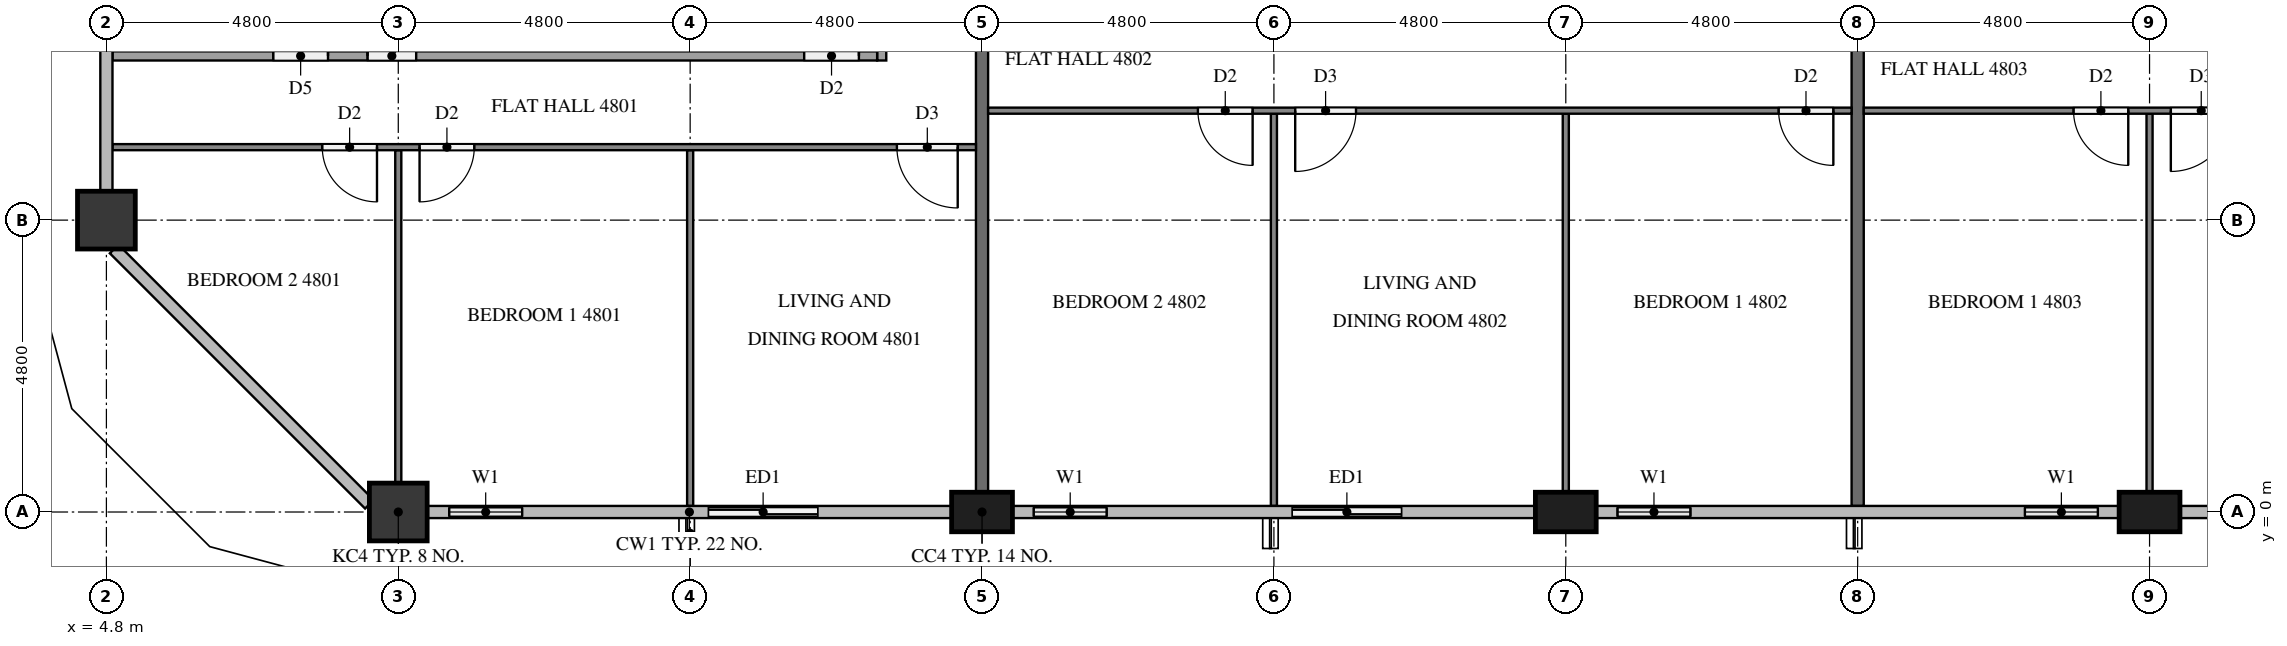
"""IFC4 building model, lengths in metres.
Left out: names, types, materials, properties, quantities, classifications, styles, units other than length and angle.
Written with IfcOpenShell. Run it as: python <this file> out.ifc"""

import sys

from ifc_helpers import new_model, si_unit, direction, frame, frame_2d, origin, origin_2d, place, context, subcontext, project, spatial, rectangle, extrude, element, fill, save


model = new_model("IFC4")
c1 = context("Model", 3, precision=1e-05, world=origin(), true_north=direction((0.0, 1.0)))
c2 = subcontext(c1, "Body", "Model", "MODEL_VIEW")
j1 = project(units=[si_unit("LENGTHUNIT", "METRE"), si_unit("PLANEANGLEUNIT", "RADIAN")], contexts=[c1])
p1 = place(None, origin())
s1 = spatial("IfcSite", under=j1, at=p1, CompositionType="ELEMENT")
p2 = place(p1, origin())
s2 = spatial("IfcBuilding", under=s1, at=p2, CompositionType="ELEMENT")
p3 = place(p2, frame((0.0, 0.0, 185.9)))
s3 = spatial("IfcBuildingStorey", under=s2, at=p3, CompositionType="ELEMENT", Elevation=185.9)
p4 = place(p3, frame((9.6, 0.0, 0.0), z_axis=(0.0, 0.0, 1.0), x_axis=(1.0, 0.0, 0.0)))
e1 = element("IfcColumn", 1, at=p4, inside=s3, PredefinedType="COLUMN", context=c2, shape_type="SweptSolid", body=[
    extrude(rectangle(XDim=0.95, YDim=0.95, at=origin_2d()), origin(), (0.0, 0.0, 1.0), 3.2),
])
for number, where, z_axis, x_axis in (
    (2, (19.2, 0.0, 0.0), (0.0, 0.0, 1.0), (1.0, 0.0, 0.0)),
    (3, (28.8, 0.0, 0.0), (0.0, 0.0, 1.0), (1.0, 0.0, 0.0)),
    (4, (38.4, 0.0, 0.0), (0.0, 0.0, 1.0), (1.0, 0.0, 0.0)),
):
    element("IfcColumn", number, at=place(p3, frame(where, z_axis=z_axis, x_axis=x_axis)), inside=s3, PredefinedType="COLUMN", context=c2, shape_type="SweptSolid", body=[
        extrude(rectangle(XDim=1.0, YDim=0.65, at=origin_2d()), origin(), (0.0, 0.0, 1.0), 3.2),
    ])
p5 = place(p3, frame((4.8, 4.8, 0.0), z_axis=(0.0, 0.0, 1.0), x_axis=(1.0, 0.0, 0.0)))
e5 = element("IfcColumn", 5, at=p5, inside=s3, PredefinedType="COLUMN", context=c2, shape_type="SweptSolid", body=[
    extrude(rectangle(XDim=0.95, YDim=0.95, at=origin_2d()), origin(), (0.0, 0.0, 1.0), 3.2),
])
p6 = place(p3, frame((10.075, 0.0, 0.0), z_axis=(0.0, 0.0, 1.0), x_axis=(1.0, 0.0, 0.0)))
e6 = element("IfcWall", 6, at=p6, inside=s3, PredefinedType="SOLIDWALL", context=c2, shape_type="SweptSolid", body=[
    extrude(rectangle(XDim=1.925, YDim=0.15, at=frame_2d((0.962, 0.0))), origin(), (0.0, 0.0, 1.0), 3.2),
])
p7 = place(p6, frame((0.363, 0.0, 0.9)))
e7 = element("IfcOpeningElement", 7, at=p7, cuts=e6, PredefinedType="OPENING", context=c2, shape_type="SweptSolid", body=[
    extrude(rectangle(XDim=1.2, YDim=1.4, at=frame_2d((0.6, 0.7))), frame((0.0, 0.085, 0.0), z_axis=(0.0, -1.0, 0.0), x_axis=(1.0, 0.0, 0.0)), (0.0, 0.0, 1.0), 0.17),
])
p8 = place(p3, frame((14.4, 0.0, 0.0), z_axis=(0.0, 0.0, 1.0), x_axis=(1.0, 0.0, 0.0)))
e8 = element("IfcWall", 8, at=p8, inside=s3, PredefinedType="SOLIDWALL", context=c2, shape_type="SweptSolid", body=[
    extrude(rectangle(XDim=2.4, YDim=0.15, at=frame_2d((1.2, 0.0))), origin(), (0.0, 0.0, 1.0), 3.2),
])
p9 = place(p8, frame((0.3, 0.0, 0.0)))
e9 = element("IfcOpeningElement", 9, at=p9, cuts=e8, PredefinedType="OPENING", context=c2, shape_type="SweptSolid", body=[
    extrude(rectangle(XDim=1.8, YDim=2.4, at=frame_2d((0.9, 1.2))), frame((0.0, 0.085, 0.0), z_axis=(0.0, -1.0, 0.0), x_axis=(1.0, 0.0, 0.0)), (0.0, 0.0, 1.0), 0.17),
])
p10 = place(p3, frame((19.7, 0.0, 0.0), z_axis=(0.0, 0.0, 1.0), x_axis=(1.0, 0.0, 0.0)))
e10 = element("IfcWall", 10, at=p10, inside=s3, PredefinedType="SOLIDWALL", context=c2, shape_type="SweptSolid", body=[
    extrude(rectangle(XDim=1.9, YDim=0.15, at=frame_2d((0.95, 0.0))), origin(), (0.0, 0.0, 1.0), 3.2),
])
p11 = place(p10, frame((0.35, 0.0, 0.9)))
e11 = element("IfcOpeningElement", 11, at=p11, cuts=e10, PredefinedType="OPENING", context=c2, shape_type="SweptSolid", body=[
    extrude(rectangle(XDim=1.2, YDim=1.4, at=frame_2d((0.6, 0.7))), frame((0.0, 0.085, 0.0), z_axis=(0.0, -1.0, 0.0), x_axis=(1.0, 0.0, 0.0)), (0.0, 0.0, 1.0), 0.17),
])
p12 = place(p3, frame((24.0, 0.0, 0.0), z_axis=(0.0, 0.0, 1.0), x_axis=(1.0, 0.0, 0.0)))
e12 = element("IfcWall", 12, at=p12, inside=s3, PredefinedType="SOLIDWALL", context=c2, shape_type="SweptSolid", body=[
    extrude(rectangle(XDim=2.4, YDim=0.15, at=frame_2d((1.2, 0.0))), origin(), (0.0, 0.0, 1.0), 3.2),
])
p13 = place(p12, frame((0.3, 0.0, 0.0)))
e13 = element("IfcOpeningElement", 13, at=p13, cuts=e12, PredefinedType="OPENING", context=c2, shape_type="SweptSolid", body=[
    extrude(rectangle(XDim=1.8, YDim=2.4, at=frame_2d((0.9, 1.2))), frame((0.0, 0.085, 0.0), z_axis=(0.0, -1.0, 0.0), x_axis=(1.0, 0.0, 0.0)), (0.0, 0.0, 1.0), 0.17),
])
p14 = place(p3, frame((29.3, 0.0, 0.0), z_axis=(0.0, 0.0, 1.0), x_axis=(1.0, 0.0, 0.0)))
e14 = element("IfcWall", 14, at=p14, inside=s3, PredefinedType="SOLIDWALL", context=c2, shape_type="SweptSolid", body=[
    extrude(rectangle(XDim=1.9, YDim=0.15, at=frame_2d((0.95, 0.0))), origin(), (0.0, 0.0, 1.0), 3.2),
])
p15 = place(p14, frame((0.35, 0.0, 0.9)))
e15 = element("IfcOpeningElement", 15, at=p15, cuts=e14, PredefinedType="OPENING", context=c2, shape_type="SweptSolid", body=[
    extrude(rectangle(XDim=1.2, YDim=1.4, at=frame_2d((0.6, 0.7))), frame((0.0, 0.085, 0.0), z_axis=(0.0, -1.0, 0.0), x_axis=(1.0, 0.0, 0.0)), (0.0, 0.0, 1.0), 0.17),
])
p16 = place(p3, frame((36.0, 0.0, 0.0), z_axis=(0.0, 0.0, 1.0), x_axis=(1.0, 0.0, 0.0)))
e16 = element("IfcWall", 16, at=p16, inside=s3, PredefinedType="SOLIDWALL", context=c2, shape_type="SweptSolid", body=[
    extrude(rectangle(XDim=1.9, YDim=0.15, at=frame_2d((0.95, 0.0))), origin(), (0.0, 0.0, 1.0), 3.2),
])
p17 = place(p16, frame((0.35, 0.0, 0.9)))
e17 = element("IfcOpeningElement", 17, at=p17, cuts=e16, PredefinedType="OPENING", context=c2, shape_type="SweptSolid", body=[
    extrude(rectangle(XDim=1.2, YDim=1.4, at=frame_2d((0.6, 0.7))), frame((0.0, 0.085, 0.0), z_axis=(0.0, -1.0, 0.0), x_axis=(1.0, 0.0, 0.0)), (0.0, 0.0, 1.0), 0.17),
])
p18 = place(p3, frame((19.2, 11.9, 0.0), z_axis=(0.0, 0.0, 1.0), x_axis=(0.0, -1.0, 0.0)))
e18 = element("IfcWall", 18, at=p18, inside=s3, PredefinedType="PARTITIONING", context=c2, shape_type="SweptSolid", body=[
    extrude(rectangle(XDim=11.575, YDim=0.2, at=frame_2d((5.788, 0.0))), origin(), (0.0, 0.0, 1.0), 3.2),
])
p19 = place(p3, frame((33.6, 11.9, 0.0), z_axis=(0.0, 0.0, 1.0), x_axis=(0.0, -1.0, 0.0)))
e19 = element("IfcWall", 19, at=p19, inside=s3, PredefinedType="PARTITIONING", context=c2, shape_type="SweptSolid", body=[
    extrude(rectangle(XDim=11.8, YDim=0.2, at=frame_2d((5.9, 0.0))), origin(), (0.0, 0.0, 1.0), 3.2),
])
p20 = place(p3, frame((14.4, 5.95, 0.0), z_axis=(0.0, 0.0, 1.0), x_axis=(0.0, -1.0, 0.0)))
e20 = element("IfcWall", 20, at=p20, inside=s3, PredefinedType="PARTITIONING", context=c2, shape_type="SweptSolid", body=[
    extrude(rectangle(XDim=5.85, YDim=0.1, at=frame_2d((2.925, 0.0))), origin(), (0.0, 0.0, 1.0), 3.2),
])
p21 = place(p3, frame((9.6, 5.95, 0.0), z_axis=(0.0, 0.0, 1.0), x_axis=(0.0, -1.0, 0.0)))
e21 = element("IfcWall", 21, at=p21, inside=s3, PredefinedType="PARTITIONING", context=c2, shape_type="SweptSolid", body=[
    extrude(rectangle(XDim=5.475, YDim=0.1, at=frame_2d((2.737, 0.0))), origin(), (0.0, 0.0, 1.0), 3.2),
])
p22 = place(p3, frame((19.1, 6.0, 0.0), z_axis=(0.0, 0.0, 1.0), x_axis=(-1.0, 0.0, 0.0)))
e22 = element("IfcWall", 22, at=p22, inside=s3, PredefinedType="PARTITIONING", context=c2, shape_type="SweptSolid", body=[
    extrude(rectangle(XDim=14.2, YDim=0.1, at=frame_2d((7.1, 0.0))), origin(), (0.0, 0.0, 1.0), 3.2),
])
p23 = place(p22, frame((0.3, 0.0, 0.0)))
e23 = element("IfcOpeningElement", 23, at=p23, cuts=e22, PredefinedType="OPENING", context=c2, shape_type="SweptSolid", body=[
    extrude(rectangle(XDim=1.0, YDim=2.1, at=frame_2d((0.5, 1.05))), frame((0.0, 0.06, 0.0), z_axis=(0.0, -1.0, 0.0), x_axis=(1.0, 0.0, 0.0)), (0.0, 0.0, 1.0), 0.12),
])
p24 = place(p22, frame((8.25, 0.0, 0.0)))
e24 = element("IfcOpeningElement", 24, at=p24, cuts=e22, PredefinedType="OPENING", context=c2, shape_type="SweptSolid", body=[
    extrude(rectangle(XDim=0.9, YDim=2.1, at=frame_2d((0.45, 1.05))), frame((0.0, 0.06, 0.0), z_axis=(0.0, -1.0, 0.0), x_axis=(1.0, 0.0, 0.0)), (0.0, 0.0, 1.0), 0.12),
])
p25 = place(p22, frame((9.85, 0.0, 0.0)))
e25 = element("IfcOpeningElement", 25, at=p25, cuts=e22, PredefinedType="OPENING", context=c2, shape_type="SweptSolid", body=[
    extrude(rectangle(XDim=0.9, YDim=2.1, at=frame_2d((0.45, 1.05))), frame((0.0, 0.06, 0.0), z_axis=(0.0, -1.0, 0.0), x_axis=(1.0, 0.0, 0.0)), (0.0, 0.0, 1.0), 0.12),
])
p26 = place(p3, frame((17.55, 11.9, 0.0), z_axis=(0.0, 0.0, 1.0), x_axis=(0.0, -1.0, 0.0)))
e26 = element("IfcWall", 26, at=p26, inside=s3, PredefinedType="PARTITIONING", context=c2, shape_type="SweptSolid", body=[
    extrude(rectangle(XDim=4.475, YDim=0.15, at=frame_2d((2.237, 0.0))), origin(), (0.0, 0.0, 1.0), 3.2),
])
p27 = place(p3, frame((4.9, 7.5, 0.0), z_axis=(0.0, 0.0, 1.0), x_axis=(1.0, 0.0, 0.0)))
e27 = element("IfcWall", 27, at=p27, inside=s3, PredefinedType="PARTITIONING", context=c2, shape_type="SweptSolid", body=[
    extrude(rectangle(XDim=12.575, YDim=0.15, at=frame_2d((6.288, 0.0))), origin(), (0.0, 0.0, 1.0), 3.2),
])
p28 = place(p27, frame((11.375, 0.0, 0.0)))
e28 = element("IfcOpeningElement", 28, at=p28, cuts=e27, PredefinedType="OPENING", context=c2, shape_type="SweptSolid", body=[
    extrude(rectangle(XDim=0.9, YDim=2.1, at=frame_2d((0.45, 1.05))), frame((0.0, 0.085, 0.0), z_axis=(0.0, -1.0, 0.0), x_axis=(1.0, 0.0, 0.0)), (0.0, 0.0, 1.0), 0.17),
])
p29 = place(p27, frame((4.194, 0.0, 0.0)))
e29 = element("IfcOpeningElement", 29, at=p29, cuts=e27, PredefinedType="OPENING", context=c2, shape_type="SweptSolid", body=[
    extrude(rectangle(XDim=0.8, YDim=2.1, at=frame_2d((0.4, 1.05))), frame((0.0, 0.085, 0.0), z_axis=(0.0, -1.0, 0.0), x_axis=(1.0, 0.0, 0.0)), (0.0, 0.0, 1.0), 0.17),
])
p30 = place(p27, frame((2.644, 0.0, 0.0)))
e30 = element("IfcOpeningElement", 30, at=p30, cuts=e27, PredefinedType="OPENING", context=c2, shape_type="SweptSolid", body=[
    extrude(rectangle(XDim=0.9, YDim=2.1, at=frame_2d((0.45, 1.05))), frame((0.0, 0.085, 0.0), z_axis=(0.0, -1.0, 0.0), x_axis=(1.0, 0.0, 0.0)), (0.0, 0.0, 1.0), 0.17),
])
p31 = place(p3, frame((28.8, 6.55, 0.0), z_axis=(0.0, 0.0, 1.0), x_axis=(0.0, -1.0, 0.0)))
e31 = element("IfcWall", 31, at=p31, inside=s3, PredefinedType="PARTITIONING", context=c2, shape_type="SweptSolid", body=[
    extrude(rectangle(XDim=6.225, YDim=0.1, at=frame_2d((3.113, 0.0))), origin(), (0.0, 0.0, 1.0), 3.2),
])
p32 = place(p3, frame((24.0, 6.55, 0.0), z_axis=(0.0, 0.0, 1.0), x_axis=(0.0, -1.0, 0.0)))
e32 = element("IfcWall", 32, at=p32, inside=s3, PredefinedType="PARTITIONING", context=c2, shape_type="SweptSolid", body=[
    extrude(rectangle(XDim=6.45, YDim=0.1, at=frame_2d((3.225, 0.0))), origin(), (0.0, 0.0, 1.0), 3.2),
])
p33 = place(p3, frame((33.5, 6.6, 0.0), z_axis=(0.0, 0.0, 1.0), x_axis=(-1.0, 0.0, 0.0)))
e33 = element("IfcWall", 33, at=p33, inside=s3, PredefinedType="PARTITIONING", context=c2, shape_type="SweptSolid", body=[
    extrude(rectangle(XDim=14.2, YDim=0.1, at=frame_2d((7.1, 0.0))), origin(), (0.0, 0.0, 1.0), 3.2),
])
p34 = place(p33, frame((0.3, 0.0, 0.0)))
e34 = element("IfcOpeningElement", 34, at=p34, cuts=e33, PredefinedType="OPENING", context=c2, shape_type="SweptSolid", body=[
    extrude(rectangle(XDim=0.9, YDim=2.1, at=frame_2d((0.45, 1.05))), frame((0.0, 0.06, 0.0), z_axis=(0.0, -1.0, 0.0), x_axis=(1.0, 0.0, 0.0)), (0.0, 0.0, 1.0), 0.12),
])
p35 = place(p33, frame((8.15, 0.0, 0.0)))
e35 = element("IfcOpeningElement", 35, at=p35, cuts=e33, PredefinedType="OPENING", context=c2, shape_type="SweptSolid", body=[
    extrude(rectangle(XDim=1.0, YDim=2.1, at=frame_2d((0.5, 1.05))), frame((0.0, 0.06, 0.0), z_axis=(0.0, -1.0, 0.0), x_axis=(1.0, 0.0, 0.0)), (0.0, 0.0, 1.0), 0.12),
])
p36 = place(p33, frame((9.85, 0.0, 0.0)))
e36 = element("IfcOpeningElement", 36, at=p36, cuts=e33, PredefinedType="OPENING", context=c2, shape_type="SweptSolid", body=[
    extrude(rectangle(XDim=0.9, YDim=2.1, at=frame_2d((0.45, 1.05))), frame((0.0, 0.06, 0.0), z_axis=(0.0, -1.0, 0.0), x_axis=(1.0, 0.0, 0.0)), (0.0, 0.0, 1.0), 0.12),
])
p37 = place(p3, frame((38.4, 6.55, 0.0), z_axis=(0.0, 0.0, 1.0), x_axis=(0.0, -1.0, 0.0)))
e37 = element("IfcWall", 37, at=p37, inside=s3, PredefinedType="PARTITIONING", context=c2, shape_type="SweptSolid", body=[
    extrude(rectangle(XDim=6.225, YDim=0.1, at=frame_2d((3.113, 0.0))), origin(), (0.0, 0.0, 1.0), 3.2),
])
p38 = place(p3, frame((43.1, 6.6, 0.0), z_axis=(0.0, 0.0, 1.0), x_axis=(-1.0, 0.0, 0.0)))
e38 = element("IfcWall", 38, at=p38, inside=s3, PredefinedType="PARTITIONING", context=c2, shape_type="SweptSolid", body=[
    extrude(rectangle(XDim=9.4, YDim=0.1, at=frame_2d((4.7, 0.0))), origin(), (0.0, 0.0, 1.0), 3.2),
])
p39 = place(p38, frame((3.35, 0.0, 0.0)))
e39 = element("IfcOpeningElement", 39, at=p39, cuts=e38, PredefinedType="OPENING", context=c2, shape_type="SweptSolid", body=[
    extrude(rectangle(XDim=1.0, YDim=2.1, at=frame_2d((0.5, 1.05))), frame((0.0, 0.06, 0.0), z_axis=(0.0, -1.0, 0.0), x_axis=(1.0, 0.0, 0.0)), (0.0, 0.0, 1.0), 0.12),
])
p40 = place(p38, frame((5.05, 0.0, 0.0)))
e40 = element("IfcOpeningElement", 40, at=p40, cuts=e38, PredefinedType="OPENING", context=c2, shape_type="SweptSolid", body=[
    extrude(rectangle(XDim=0.9, YDim=2.1, at=frame_2d((0.45, 1.05))), frame((0.0, 0.06, 0.0), z_axis=(0.0, -1.0, 0.0), x_axis=(1.0, 0.0, 0.0)), (0.0, 0.0, 1.0), 0.12),
])
p41 = place(p7, origin())
e41 = element("IfcWindow", 41, at=p41, inside=s3, PartitioningType="SINGLE_PANEL", PredefinedType="WINDOW", context=c2, shape_type="SweptSolid", body=[
    extrude(rectangle(XDim=1.2, YDim=1.4, at=frame_2d((0.6, 0.7))), frame((0.0, 0.03, 0.0), z_axis=(0.0, -1.0, 0.0), x_axis=(1.0, 0.0, 0.0)), (0.0, 0.0, 1.0), 0.06),
])
fill(e7, e41)
p42 = place(p9, origin())
e42 = element("IfcDoor", 42, at=p42, inside=s3, OperationType="SLIDING_TO_LEFT", PredefinedType="DOOR", context=c2, shape_type="SweptSolid", body=[
    extrude(rectangle(XDim=1.8, YDim=2.4, at=frame_2d((0.9, 1.2))), frame((0.0, 0.025, 0.0), z_axis=(0.0, -1.0, 0.0), x_axis=(1.0, 0.0, 0.0)), (0.0, 0.0, 1.0), 0.05),
])
fill(e9, e42)
p43 = place(p11, origin())
e43 = element("IfcWindow", 43, at=p43, inside=s3, PartitioningType="SINGLE_PANEL", PredefinedType="WINDOW", context=c2, shape_type="SweptSolid", body=[
    extrude(rectangle(XDim=1.2, YDim=1.4, at=frame_2d((0.6, 0.7))), frame((0.0, 0.03, 0.0), z_axis=(0.0, -1.0, 0.0), x_axis=(1.0, 0.0, 0.0)), (0.0, 0.0, 1.0), 0.06),
])
fill(e11, e43)
p44 = place(p13, origin())
e44 = element("IfcDoor", 44, at=p44, inside=s3, OperationType="SLIDING_TO_RIGHT", PredefinedType="DOOR", context=c2, shape_type="SweptSolid", body=[
    extrude(rectangle(XDim=1.8, YDim=2.4, at=frame_2d((0.9, 1.2))), frame((0.0, 0.025, 0.0), z_axis=(0.0, -1.0, 0.0), x_axis=(1.0, 0.0, 0.0)), (0.0, 0.0, 1.0), 0.05),
])
fill(e13, e44)
p45 = place(p15, origin())
e45 = element("IfcWindow", 45, at=p45, inside=s3, PartitioningType="SINGLE_PANEL", PredefinedType="WINDOW", context=c2, shape_type="SweptSolid", body=[
    extrude(rectangle(XDim=1.2, YDim=1.4, at=frame_2d((0.6, 0.7))), frame((0.0, 0.03, 0.0), z_axis=(0.0, -1.0, 0.0), x_axis=(1.0, 0.0, 0.0)), (0.0, 0.0, 1.0), 0.06),
])
fill(e15, e45)
p46 = place(p17, origin())
e46 = element("IfcWindow", 46, at=p46, inside=s3, PartitioningType="SINGLE_PANEL", PredefinedType="WINDOW", context=c2, shape_type="SweptSolid", body=[
    extrude(rectangle(XDim=1.2, YDim=1.4, at=frame_2d((0.6, 0.7))), frame((0.0, 0.03, 0.0), z_axis=(0.0, -1.0, 0.0), x_axis=(1.0, 0.0, 0.0)), (0.0, 0.0, 1.0), 0.06),
])
fill(e17, e46)
p47 = place(p23, origin())
e47 = element("IfcDoor", 47, at=p47, inside=s3, OperationType="SINGLE_SWING_LEFT", PredefinedType="DOOR", context=c2, shape_type="SweptSolid", body=[
    extrude(rectangle(XDim=1.0, YDim=2.1, at=frame_2d((0.5, 1.05))), frame((0.0, 0.025, 0.0), z_axis=(0.0, -1.0, 0.0), x_axis=(1.0, 0.0, 0.0)), (0.0, 0.0, 1.0), 0.05),
])
fill(e23, e47)
p48 = place(p24, origin())
e48 = element("IfcDoor", 48, at=p48, inside=s3, OperationType="SINGLE_SWING_RIGHT", PredefinedType="DOOR", context=c2, shape_type="SweptSolid", body=[
    extrude(rectangle(XDim=0.9, YDim=2.1, at=frame_2d((0.45, 1.05))), frame((0.0, 0.025, 0.0), z_axis=(0.0, -1.0, 0.0), x_axis=(1.0, 0.0, 0.0)), (0.0, 0.0, 1.0), 0.05),
])
fill(e24, e48)
p49 = place(p25, origin())
e49 = element("IfcDoor", 49, at=p49, inside=s3, OperationType="SINGLE_SWING_LEFT", PredefinedType="DOOR", context=c2, shape_type="SweptSolid", body=[
    extrude(rectangle(XDim=0.9, YDim=2.1, at=frame_2d((0.45, 1.05))), frame((0.0, 0.025, 0.0), z_axis=(0.0, -1.0, 0.0), x_axis=(1.0, 0.0, 0.0)), (0.0, 0.0, 1.0), 0.05),
])
fill(e25, e49)
p50 = place(p28, origin())
e50 = element("IfcDoor", 50, at=p50, inside=s3, OperationType="SINGLE_SWING_RIGHT", PredefinedType="DOOR", context=c2, shape_type="SweptSolid", body=[
    extrude(rectangle(XDim=0.9, YDim=2.1, at=frame_2d((0.45, 1.05))), frame((0.0, 0.025, 0.0), z_axis=(0.0, -1.0, 0.0), x_axis=(1.0, 0.0, 0.0)), (0.0, 0.0, 1.0), 0.05),
])
fill(e28, e50)
p51 = place(p29, origin())
e51 = element("IfcDoor", 51, at=p51, inside=s3, OperationType="SINGLE_SWING_LEFT", PredefinedType="DOOR", context=c2, shape_type="SweptSolid", body=[
    extrude(rectangle(XDim=0.8, YDim=2.1, at=frame_2d((0.4, 1.05))), frame((0.0, 0.025, 0.0), z_axis=(0.0, -1.0, 0.0), x_axis=(1.0, 0.0, 0.0)), (0.0, 0.0, 1.0), 0.05),
])
fill(e29, e51)
p52 = place(p30, origin())
e52 = element("IfcDoor", 52, at=p52, inside=s3, OperationType="SINGLE_SWING_RIGHT", PredefinedType="DOOR", context=c2, shape_type="SweptSolid", body=[
    extrude(rectangle(XDim=0.9, YDim=2.1, at=frame_2d((0.45, 1.05))), frame((0.0, 0.025, 0.0), z_axis=(0.0, -1.0, 0.0), x_axis=(1.0, 0.0, 0.0)), (0.0, 0.0, 1.0), 0.05),
])
fill(e30, e52)
p53 = place(p34, origin())
e53 = element("IfcDoor", 53, at=p53, inside=s3, OperationType="SINGLE_SWING_LEFT", PredefinedType="DOOR", context=c2, shape_type="SweptSolid", body=[
    extrude(rectangle(XDim=0.9, YDim=2.1, at=frame_2d((0.45, 1.05))), frame((0.0, 0.025, 0.0), z_axis=(0.0, -1.0, 0.0), x_axis=(1.0, 0.0, 0.0)), (0.0, 0.0, 1.0), 0.05),
])
fill(e34, e53)
p54 = place(p35, origin())
e54 = element("IfcDoor", 54, at=p54, inside=s3, OperationType="SINGLE_SWING_RIGHT", PredefinedType="DOOR", context=c2, shape_type="SweptSolid", body=[
    extrude(rectangle(XDim=1.0, YDim=2.1, at=frame_2d((0.5, 1.05))), frame((0.0, 0.025, 0.0), z_axis=(0.0, -1.0, 0.0), x_axis=(1.0, 0.0, 0.0)), (0.0, 0.0, 1.0), 0.05),
])
fill(e35, e54)
p55 = place(p36, origin())
e55 = element("IfcDoor", 55, at=p55, inside=s3, OperationType="SINGLE_SWING_LEFT", PredefinedType="DOOR", context=c2, shape_type="SweptSolid", body=[
    extrude(rectangle(XDim=0.9, YDim=2.1, at=frame_2d((0.45, 1.05))), frame((0.0, 0.025, 0.0), z_axis=(0.0, -1.0, 0.0), x_axis=(1.0, 0.0, 0.0)), (0.0, 0.0, 1.0), 0.05),
])
fill(e36, e55)
p56 = place(p39, origin())
e56 = element("IfcDoor", 56, at=p56, inside=s3, OperationType="SINGLE_SWING_RIGHT", PredefinedType="DOOR", context=c2, shape_type="SweptSolid", body=[
    extrude(rectangle(XDim=1.0, YDim=2.1, at=frame_2d((0.5, 1.05))), frame((0.0, 0.025, 0.0), z_axis=(0.0, -1.0, 0.0), x_axis=(1.0, 0.0, 0.0)), (0.0, 0.0, 1.0), 0.05),
])
fill(e39, e56)
p57 = place(p40, origin())
e57 = element("IfcDoor", 57, at=p57, inside=s3, OperationType="SINGLE_SWING_LEFT", PredefinedType="DOOR", context=c2, shape_type="SweptSolid", body=[
    extrude(rectangle(XDim=0.9, YDim=2.1, at=frame_2d((0.45, 1.05))), frame((0.0, 0.025, 0.0), z_axis=(0.0, -1.0, 0.0), x_axis=(1.0, 0.0, 0.0)), (0.0, 0.0, 1.0), 0.05),
])
fill(e40, e57)
save(model, sys.argv[1])
